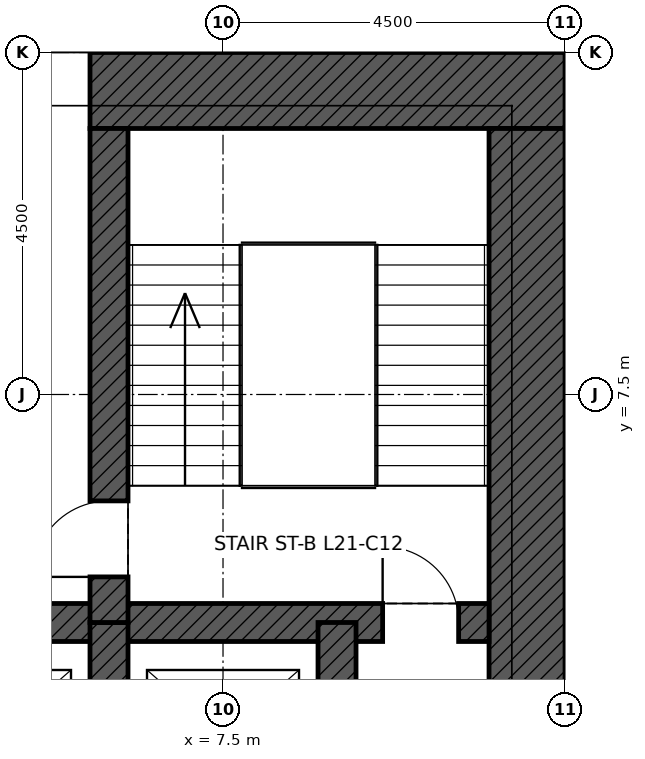
"""IFC4 building model, lengths in metres.
Left out: names, types, materials, properties, quantities, classifications, styles, units other than length and angle.
Written with IfcOpenShell. Run it as: python <this file> out.ifc"""

import sys

from ifc_helpers import new_model, si_unit, direction, frame, frame_2d, origin, place, context, subcontext, project, spatial, rectangle, extrude, element, fill, save


model = new_model("IFC4")
c1 = context("Model", 3, precision=1e-05, world=origin(), true_north=direction((0.0, 1.0)))
c2 = subcontext(c1, "Body", "Model", "MODEL_VIEW")
j1 = project(units=[si_unit("LENGTHUNIT", "METRE"), si_unit("PLANEANGLEUNIT", "RADIAN")], contexts=[c1])
p1 = place(None, origin())
s1 = spatial("IfcSite", under=j1, at=p1, CompositionType="ELEMENT")
p2 = place(p1, origin())
s2 = spatial("IfcBuilding", under=s1, at=p2, CompositionType="ELEMENT")
p3 = place(p2, frame((0.0, 0.0, 108.9)))
s3 = spatial("IfcBuildingStorey", under=s2, at=p3, CompositionType="ELEMENT", Elevation=108.9)
p4 = place(p3, frame((-12.0, 11.5, 0.0), z_axis=(0.0, 0.0, 1.0), x_axis=(1.0, 0.0, 0.0)))
e1 = element("IfcWall", 1, at=p4, inside=s3, PredefinedType="SHEAR", context=c2, shape_type="SweptSolid", body=[
    extrude(rectangle(XDim=24.0, YDim=1.0, at=frame_2d((12.0, 0.0))), origin(), (0.0, 0.0, 1.0), 4.5),
])
p5 = place(p4, frame((6.25, 0.0, 0.0)))
e2 = element("IfcOpeningElement", 2, at=p5, cuts=e1, PredefinedType="OPENING", context=c2, shape_type="SweptSolid", body=[
    extrude(rectangle(XDim=1.0, YDim=2.4, at=frame_2d((0.5, 1.2))), frame((0.0, 0.51, 0.0), z_axis=(0.0, -1.0, 0.0), x_axis=(1.0, 0.0, 0.0)), (0.0, 0.0, 1.0), 1.02),
])
p6 = place(p4, frame((16.75, 0.0, 0.0)))
e3 = element("IfcOpeningElement", 3, at=p6, cuts=e1, PredefinedType="OPENING", context=c2, shape_type="SweptSolid", body=[
    extrude(rectangle(XDim=1.0, YDim=2.4, at=frame_2d((0.5, 1.2))), frame((0.0, 0.51, 0.0), z_axis=(0.0, -1.0, 0.0), x_axis=(1.0, 0.0, 0.0)), (0.0, 0.0, 1.0), 1.02),
])
p7 = place(p3, frame((11.5, 11.0, 0.0), z_axis=(0.0, 0.0, 1.0), x_axis=(0.0, -1.0, 0.0)))
e4 = element("IfcWall", 4, at=p7, inside=s3, PredefinedType="SHEAR", context=c2, shape_type="SweptSolid", body=[
    extrude(rectangle(XDim=22.0, YDim=1.0, at=frame_2d((11.0, 0.0))), origin(), (0.0, 0.0, 1.0), 4.5),
])
p8 = place(p7, frame((10.5, 0.0, 0.0)))
e5 = element("IfcOpeningElement", 5, at=p8, cuts=e4, PredefinedType="OPENING", context=c2, shape_type="SweptSolid", body=[
    extrude(rectangle(XDim=1.0, YDim=2.4, at=frame_2d((0.5, 1.2))), frame((0.0, 0.51, 0.0), z_axis=(0.0, -1.0, 0.0), x_axis=(1.0, 0.0, 0.0)), (0.0, 0.0, 1.0), 1.02),
])
p9 = place(p3, frame((-11.0, 4.5, 0.0), z_axis=(0.0, 0.0, 1.0), x_axis=(1.0, 0.0, 0.0)))
e6 = element("IfcWall", 6, at=p9, inside=s3, PredefinedType="SHEAR", context=c2, shape_type="SweptSolid", body=[
    extrude(rectangle(XDim=22.0, YDim=0.5, at=frame_2d((11.0, 0.0))), origin(), (0.0, 0.0, 1.0), 4.5),
])
p10 = place(p9, frame((0.4, 0.0, 0.0)))
e7 = element("IfcOpeningElement", 7, at=p10, cuts=e6, PredefinedType="OPENING", context=c2, shape_type="SweptSolid", body=[
    extrude(rectangle(XDim=1.0, YDim=2.1, at=frame_2d((0.5, 1.05))), frame((0.0, 0.26, 0.0), z_axis=(0.0, -1.0, 0.0), x_axis=(1.0, 0.0, 0.0)), (0.0, 0.0, 1.0), 0.52),
])
p11 = place(p9, frame((20.6, 0.0, 0.0)))
e8 = element("IfcOpeningElement", 8, at=p11, cuts=e6, PredefinedType="OPENING", context=c2, shape_type="SweptSolid", body=[
    extrude(rectangle(XDim=1.0, YDim=2.1, at=frame_2d((0.5, 1.05))), frame((0.0, 0.26, 0.0), z_axis=(0.0, -1.0, 0.0), x_axis=(1.0, 0.0, 0.0)), (0.0, 0.0, 1.0), 0.52),
])
for number, where, z_axis, x_axis in (
    (9, (9.0, 1.5, 0.0), (0.0, 0.0, 1.0), (0.0, 1.0, 0.0)),
    (10, (6.0, 1.5, 0.0), (0.0, 0.0, 1.0), (0.0, 1.0, 0.0)),
):
    element("IfcWall", number, at=place(p3, frame(where, z_axis=z_axis, x_axis=x_axis)), inside=s3, PredefinedType="SHEAR", context=c2, shape_type="SweptSolid", body=[
        extrude(rectangle(XDim=3.0, YDim=0.5, at=frame_2d((1.5, 0.0))), origin(), (0.0, 0.0, 1.0), 4.5),
    ])
p12 = place(p3, frame((6.0, 4.5, 0.0), z_axis=(0.0, 0.0, 1.0), x_axis=(0.0, 1.0, 0.0)))
e11 = element("IfcWall", 11, at=p12, inside=s3, PredefinedType="SHEAR", context=c2, shape_type="SweptSolid", body=[
    extrude(rectangle(XDim=6.5, YDim=0.5, at=frame_2d((3.25, 0.0))), origin(), (0.0, 0.0, 1.0), 4.5),
])
p13 = place(p12, frame((0.6, 0.0, 0.0)))
e12 = element("IfcOpeningElement", 12, at=p13, cuts=e11, PredefinedType="OPENING", context=c2, shape_type="SweptSolid", body=[
    extrude(rectangle(XDim=1.0, YDim=2.1, at=frame_2d((0.5, 1.05))), frame((0.0, 0.26, 0.0), z_axis=(0.0, -1.0, 0.0), x_axis=(1.0, 0.0, 0.0)), (0.0, 0.0, 1.0), 0.52),
])
p14 = place(p11, origin())
e13 = element("IfcDoor", 13, at=p14, inside=s3, OperationType="SINGLE_SWING_LEFT", PredefinedType="DOOR", context=c2, shape_type="SweptSolid", body=[
    extrude(rectangle(XDim=1.0, YDim=2.1, at=frame_2d((0.5, 1.05))), frame((0.0, 0.025, 0.0), z_axis=(0.0, -1.0, 0.0), x_axis=(1.0, 0.0, 0.0)), (0.0, 0.0, 1.0), 0.05),
])
fill(e8, e13)
p15 = place(p13, origin())
e14 = element("IfcDoor", 14, at=p15, inside=s3, OperationType="SINGLE_SWING_LEFT", PredefinedType="DOOR", context=c2, shape_type="SweptSolid", body=[
    extrude(rectangle(XDim=1.0, YDim=2.1, at=frame_2d((0.5, 1.05))), frame((0.0, 0.025, 0.0), z_axis=(0.0, -1.0, 0.0), x_axis=(1.0, 0.0, 0.0)), (0.0, 0.0, 1.0), 0.05),
])
fill(e12, e14)
p16 = place(p6, origin())
e15 = element("IfcDoor", 15, at=p16, inside=s3, OperationType="SINGLE_SWING_RIGHT", PredefinedType="DOOR", context=c2, shape_type="SweptSolid", body=[
    extrude(rectangle(XDim=1.0, YDim=2.4, at=frame_2d((0.5, 1.2))), frame((0.0, 0.485, 0.0), z_axis=(0.0, -1.0, 0.0), x_axis=(1.0, 0.0, 0.0)), (0.0, 0.0, 1.0), 0.05),
])
fill(e3, e15)
save(model, sys.argv[1])
